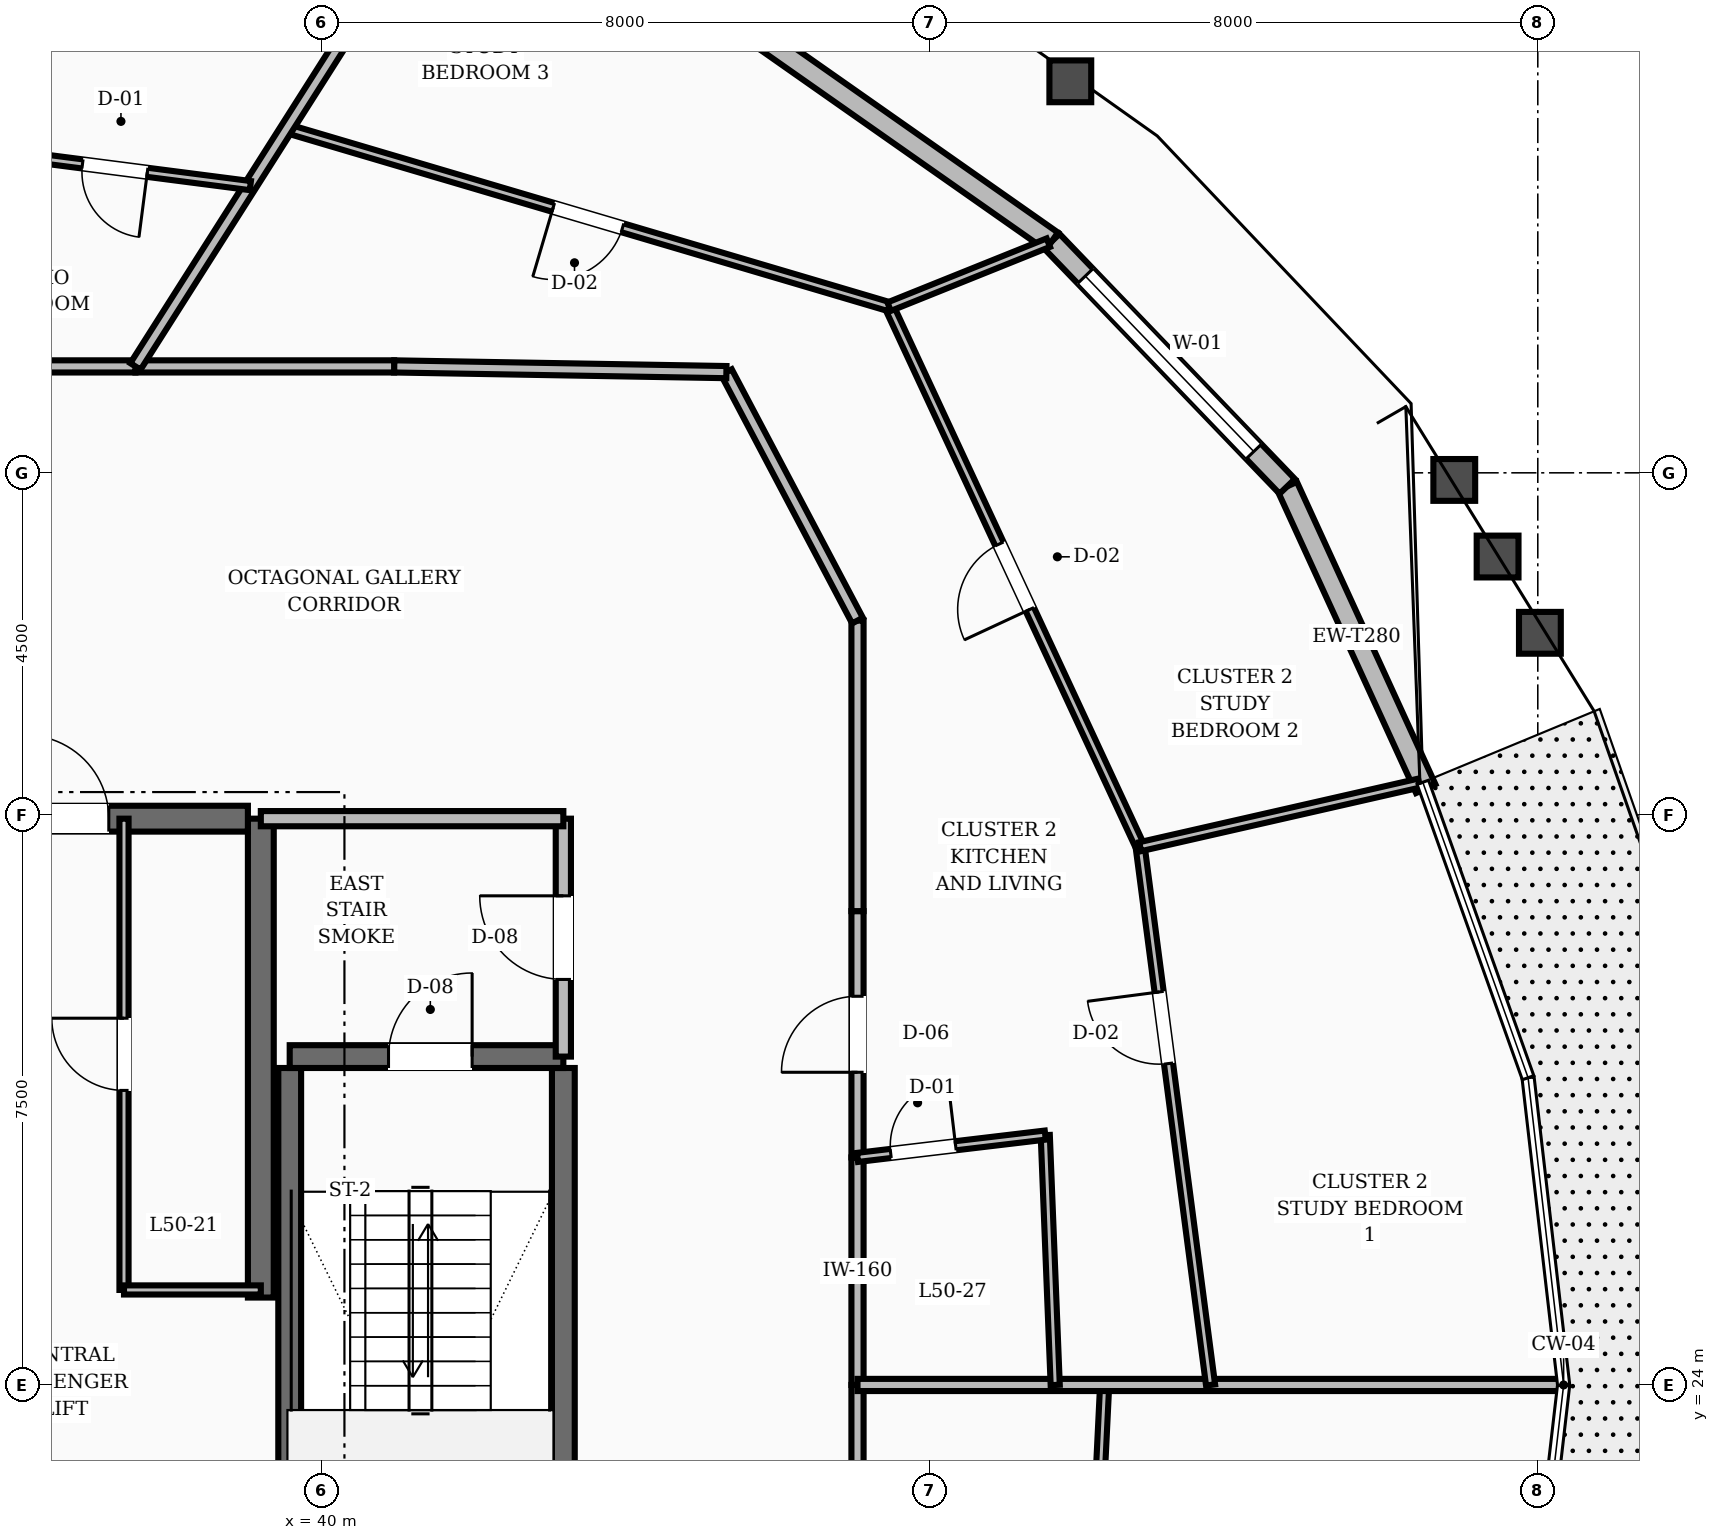
"""IFC4 building model, lengths in metres.
Left out: names, types, materials, properties, quantities, classifications, styles, units other than length and angle.
Written with IfcOpenShell. Run it as: python <this file> out.ifc"""

import sys

from ifc_helpers import new_model, si_unit, direction, frame, frame_2d, origin, place, context, subcontext, project, spatial, rectangle, extrude, element, fill, save


model = new_model("IFC4")
c1 = context("Model", 3, precision=1e-05, world=origin(), true_north=direction((0.0, 1.0)))
c2 = subcontext(c1, "Body", "Model", "MODEL_VIEW")
j1 = project(units=[si_unit("LENGTHUNIT", "METRE"), si_unit("PLANEANGLEUNIT", "RADIAN")], contexts=[c1])
p1 = place(None, origin())
s1 = spatial("IfcSite", under=j1, at=p1, CompositionType="ELEMENT")
p2 = place(p1, origin())
s2 = spatial("IfcBuilding", under=s1, at=p2, CompositionType="ELEMENT")
p3 = place(p2, frame((0.0, 0.0, 192.8)))
s3 = spatial("IfcBuildingStorey", under=s2, at=p3, CompositionType="ELEMENT", Elevation=192.8)
p4 = place(p3, frame((39.2, 25.15, 0.0), z_axis=(0.0, 0.0, 1.0), x_axis=(0.0, 1.0, 0.0)))
e1 = element("IfcWall", 1, at=p4, inside=s3, PredefinedType="SHEAR", context=c2, shape_type="SweptSolid", body=[
    extrude(rectangle(XDim=6.3, YDim=0.34, at=frame_2d((3.15, 0.0))), origin(), (0.0, 0.0, 1.0), 3.6),
])
p5 = place(p3, frame((35.8, 31.45, 0.0), z_axis=(0.0, 0.0, 1.0), x_axis=(1.0, 0.0, 0.0)))
e2 = element("IfcWall", 2, at=p5, inside=s3, PredefinedType="SHEAR", context=c2, shape_type="SweptSolid", body=[
    extrude(rectangle(XDim=3.23, YDim=0.34, at=frame_2d((1.615, 0.0))), origin(), (0.0, 0.0, 1.0), 3.6),
])
p6 = place(p5, frame((0.3, 0.0, 0.0)))
e3 = element("IfcOpeningElement", 3, at=p6, cuts=e2, PredefinedType="OPENING", context=c2, shape_type="SweptSolid", body=[
    extrude(rectangle(XDim=1.1, YDim=2.1, at=frame_2d((0.55, 1.05))), frame((0.0, 0.18, 0.0), z_axis=(0.0, -1.0, 0.0), x_axis=(1.0, 0.0, 0.0)), (0.0, 0.0, 1.0), 0.36),
])
for number, where, z_axis, x_axis in (
    (4, (43.18, 19.43, 0.0), (0.0, 0.0, 1.0), (0.0, 1.0, 0.0)),
    (5, (39.58, 19.43, 0.0), (0.0, 0.0, 1.0), (0.0, 1.0, 0.0)),
):
    element("IfcWall", number, at=place(p3, frame(where, z_axis=z_axis, x_axis=x_axis)), inside=s3, PredefinedType="SHEAR", context=c2, shape_type="SweptSolid", body=[
        extrude(rectangle(XDim=8.74, YDim=0.3, at=frame_2d((4.37, 0.0))), origin(), (0.0, 0.0, 1.0), 3.6),
    ])
p7 = place(p3, frame((39.58, 28.32, 0.0), z_axis=(0.0, 0.0, 1.0), x_axis=(1.0, 0.0, 0.0)))
e6 = element("IfcWall", 6, at=p7, inside=s3, PredefinedType="SHEAR", context=c2, shape_type="SweptSolid", body=[
    extrude(rectangle(XDim=3.6, YDim=0.3, at=frame_2d((1.8, 0.0))), origin(), (0.0, 0.0, 1.0), 3.6),
])
p8 = place(p7, frame((1.3, 0.0, 0.0)))
e7 = element("IfcOpeningElement", 7, at=p8, cuts=e6, PredefinedType="OPENING", context=c2, shape_type="SweptSolid", body=[
    extrude(rectangle(XDim=1.1, YDim=2.1, at=frame_2d((0.55, 1.05))), frame((0.0, 0.16, 0.0), z_axis=(0.0, -1.0, 0.0), x_axis=(1.0, 0.0, 0.0)), (0.0, 0.0, 1.0), 0.32),
])
p9 = place(p3, frame((54.525, 31.845, 0.0), z_axis=(0.0, 0.0, 1.0), x_axis=(-0.416479815363, 0.909144962806, 0.0)))
e8 = element("IfcWall", 8, at=p9, inside=s3, PredefinedType="STANDARD", context=c2, shape_type="SweptSolid", body=[
    extrude(rectangle(XDim=4.374, YDim=0.28, at=frame_2d((2.187, 0.0))), origin(), (0.0, 0.0, 1.0), 2.82),
])
p10 = place(p3, frame((52.704, 35.822, 0.0), z_axis=(0.0, 0.0, 1.0), x_axis=(-0.692654585046, 0.721269454375, 0.0)))
e9 = element("IfcWall", 9, at=p10, inside=s3, PredefinedType="STANDARD", context=c2, shape_type="SweptSolid", body=[
    extrude(rectangle(XDim=4.471, YDim=0.28, at=frame_2d((2.235, 0.0))), origin(), (0.0, 0.0, 1.0), 2.82),
])
p11 = place(p10, frame((0.635, 0.0, 0.8)))
e10 = element("IfcOpeningElement", 10, at=p11, cuts=e9, PredefinedType="OPENING", context=c2, shape_type="SweptSolid", body=[
    extrude(rectangle(XDim=3.2, YDim=1.65, at=frame_2d((1.6, 0.825))), frame((0.0, 0.15, 0.0), z_axis=(0.0, -1.0, 0.0), x_axis=(1.0, 0.0, 0.0)), (0.0, 0.0, 1.0), 0.3),
])
p12 = place(p3, frame((49.607, 39.047, 0.0), z_axis=(0.0, 0.0, 1.0), x_axis=(-0.818721405334, 0.574190961657, 0.0)))
e11 = element("IfcWall", 11, at=p12, inside=s3, PredefinedType="STANDARD", context=c2, shape_type="SweptSolid", body=[
    extrude(rectangle(XDim=4.609, YDim=0.28, at=frame_2d((2.304, 0.0))), origin(), (0.0, 0.0, 1.0), 2.82),
])
p13 = place(p3, frame((43.18, 28.32, 0.0), z_axis=(0.0, 0.0, 1.0), x_axis=(0.0, 1.0, 0.0)))
e12 = element("IfcWall", 12, at=p13, inside=s3, PredefinedType="SOLIDWALL", context=c2, shape_type="SweptSolid", body=[
    extrude(rectangle(XDim=3.13, YDim=0.2, at=frame_2d((1.565, 0.0))), origin(), (0.0, 0.0, 1.0), 2.8),
])
p14 = place(p13, frame((1.015, 0.0, 0.0)))
e13 = element("IfcOpeningElement", 13, at=p14, cuts=e12, PredefinedType="OPENING", context=c2, shape_type="SweptSolid", body=[
    extrude(rectangle(XDim=1.1, YDim=2.1, at=frame_2d((0.55, 1.05))), frame((0.0, 0.11, 0.0), z_axis=(0.0, -1.0, 0.0), x_axis=(1.0, 0.0, 0.0)), (0.0, 0.0, 1.0), 0.22),
])
p15 = place(p3, frame((39.2, 31.45, 0.0), z_axis=(0.0, 0.0, 1.0), x_axis=(1.0, 0.0, 0.0)))
e14 = element("IfcWall", 14, at=p15, inside=s3, PredefinedType="SOLIDWALL", context=c2, shape_type="SweptSolid", body=[
    extrude(rectangle(XDim=3.98, YDim=0.2, at=frame_2d((1.99, 0.0))), origin(), (0.0, 0.0, 1.0), 2.8),
])
p16 = place(p3, frame((37.4, 25.25, 0.0), z_axis=(0.0, 0.0, 1.0), x_axis=(0.0, 1.0, 0.0)))
e15 = element("IfcWall", 15, at=p16, inside=s3, PredefinedType="PARTITIONING", context=c2, shape_type="SweptSolid", body=[
    extrude(rectangle(XDim=6.2, YDim=0.12, at=frame_2d((3.1, 0.0))), origin(), (0.0, 0.0, 1.0), 2.8),
])
p17 = place(p16, frame((2.625, 0.0, 0.0)))
e16 = element("IfcOpeningElement", 16, at=p17, cuts=e15, PredefinedType="OPENING", context=c2, shape_type="SweptSolid", body=[
    extrude(rectangle(XDim=0.95, YDim=2.1, at=frame_2d((0.475, 1.05))), frame((0.0, 0.07, 0.0), z_axis=(0.0, -1.0, 0.0), x_axis=(1.0, 0.0, 0.0)), (0.0, 0.0, 1.0), 0.14),
])
p18 = place(p3, frame((37.4, 25.25, 0.0), z_axis=(0.0, 0.0, 1.0), x_axis=(1.0, 0.0, 0.0)))
e17 = element("IfcWall", 17, at=p18, inside=s3, PredefinedType="PARTITIONING", context=c2, shape_type="SweptSolid", body=[
    extrude(rectangle(XDim=1.8, YDim=0.12, at=frame_2d((0.9, 0.0))), origin(), (0.0, 0.0, 1.0), 2.8),
])
p19 = place(p3, frame((47.05, 24.0, 0.0), z_axis=(0.0, 0.0, 1.0), x_axis=(0.0, 1.0, 0.0)))
e18 = element("IfcWall", 18, at=p19, inside=s3, PredefinedType="SOLIDWALL", context=c2, shape_type="SweptSolid", body=[
    extrude(rectangle(XDim=2.994, YDim=0.16, at=frame_2d((1.497, 0.0))), origin(), (0.0, 0.0, 1.0), 2.8),
])
p20 = place(p3, frame((47.05, 26.994, 0.0), z_axis=(0.0, 0.0, 1.0), x_axis=(0.0, 1.0, 0.0)))
e19 = element("IfcWall", 19, at=p20, inside=s3, PredefinedType="SOLIDWALL", context=c2, shape_type="SweptSolid", body=[
    extrude(rectangle(XDim=3.24, YDim=0.16, at=frame_2d((1.62, 0.0))), origin(), (0.0, 0.0, 1.0), 2.8),
])
p21 = place(p20, frame((1.12, 0.0, 0.0)))
e20 = element("IfcOpeningElement", 20, at=p21, cuts=e19, PredefinedType="OPENING", context=c2, shape_type="SweptSolid", body=[
    extrude(rectangle(XDim=1.0, YDim=2.1, at=frame_2d((0.5, 1.05))), frame((0.0, 0.09, 0.0), z_axis=(0.0, -1.0, 0.0), x_axis=(1.0, 0.0, 0.0)), (0.0, 0.0, 1.0), 0.18),
])
p22 = place(p3, frame((47.05, 30.234, 0.0), z_axis=(0.0, 0.0, 1.0), x_axis=(0.0, 1.0, 0.0)))
e21 = element("IfcWall", 21, at=p22, inside=s3, PredefinedType="SOLIDWALL", context=c2, shape_type="SweptSolid", body=[
    extrude(rectangle(XDim=3.822, YDim=0.16, at=frame_2d((1.911, 0.0))), origin(), (0.0, 0.0, 1.0), 2.8),
])
p23 = place(p3, frame((47.05, 34.056, 0.0), z_axis=(0.0, 0.0, 1.0), x_axis=(-0.466737093093, 0.884396113702, 0.0)))
e22 = element("IfcWall", 22, at=p23, inside=s3, PredefinedType="SOLIDWALL", context=c2, shape_type="SweptSolid", body=[
    extrude(rectangle(XDim=3.696, YDim=0.16, at=frame_2d((1.848, 0.0))), origin(), (0.0, 0.0, 1.0), 2.8),
])
p24 = place(p3, frame((45.325, 37.325, 0.0), z_axis=(0.0, 0.0, 1.0), x_axis=(-0.999853038912, 0.017143528788, 0.0)))
e23 = element("IfcWall", 23, at=p24, inside=s3, PredefinedType="SOLIDWALL", context=c2, shape_type="SweptSolid", body=[
    extrude(rectangle(XDim=4.372, YDim=0.16, at=frame_2d((2.186, 0.0))), origin(), (0.0, 0.0, 1.0), 2.8),
])
p25 = place(p3, frame((40.954, 37.4, 0.0), z_axis=(0.0, 0.0, 1.0), x_axis=(-1.0, 0.0, 0.0)))
e24 = element("IfcWall", 24, at=p25, inside=s3, PredefinedType="SOLIDWALL", context=c2, shape_type="SweptSolid", body=[
    extrude(rectangle(XDim=3.403, YDim=0.16, at=frame_2d((1.702, 0.0))), origin(), (0.0, 0.0, 1.0), 2.8),
])
p26 = place(p3, frame((37.551, 37.4, 0.0), z_axis=(0.0, 0.0, 1.0), x_axis=(-1.0, 0.0, 0.0)))
e25 = element("IfcWall", 25, at=p26, inside=s3, PredefinedType="SOLIDWALL", context=c2, shape_type="SweptSolid", body=[
    extrude(rectangle(XDim=2.885, YDim=0.16, at=frame_2d((1.443, 0.0))), origin(), (0.0, 0.0, 1.0), 2.8),
])
p27 = place(p3, frame((47.05, 21.006, 0.0), z_axis=(0.0, 0.0, 1.0), x_axis=(0.0, 1.0, 0.0)))
e26 = element("IfcWall", 26, at=p27, inside=s3, PredefinedType="SOLIDWALL", context=c2, shape_type="SweptSolid", body=[
    extrude(rectangle(XDim=2.994, YDim=0.16, at=frame_2d((1.497, 0.0))), origin(), (0.0, 0.0, 1.0), 2.8),
])
p28 = place(p3, frame((50.138, 20.639, 0.0), z_axis=(0.0, 0.0, 1.0), x_axis=(0.048689007284, 0.998813986971, 0.0)))
e27 = element("IfcWall", 27, at=p28, inside=s3, PredefinedType="PARTITIONING", context=c2, shape_type="SweptSolid", body=[
    extrude(rectangle(XDim=3.365, YDim=0.12, at=frame_2d((1.682, 0.0))), origin(), (0.0, 0.0, 1.0), 2.8),
])
p29 = place(p3, frame((47.05, 24.0, 0.0), z_axis=(0.0, 0.0, 1.0), x_axis=(1.0, 0.0, 0.0)))
e28 = element("IfcWall", 28, at=p29, inside=s3, PredefinedType="SOLIDWALL", context=c2, shape_type="SweptSolid", body=[
    extrude(rectangle(XDim=9.24, YDim=0.16, at=frame_2d((4.62, 0.0))), origin(), (0.0, 0.0, 1.0), 2.8),
])
p30 = place(p3, frame((49.651, 24.0, 0.0), z_axis=(0.0, 0.0, 1.0), x_axis=(-0.039778354948, 0.999208528025, 0.0)))
e29 = element("IfcWall", 29, at=p30, inside=s3, PredefinedType="PARTITIONING", context=c2, shape_type="SweptSolid", body=[
    extrude(rectangle(XDim=3.29, YDim=0.12, at=frame_2d((1.645, 0.0))), origin(), (0.0, 0.0, 1.0), 2.8),
])
p31 = place(p3, frame((47.05, 26.994, 0.0), z_axis=(0.0, 0.0, 1.0), x_axis=(0.993017319692, 0.117968651736, 0.0)))
e30 = element("IfcWall", 30, at=p31, inside=s3, PredefinedType="PARTITIONING", context=c2, shape_type="SweptSolid", body=[
    extrude(rectangle(XDim=2.488, YDim=0.12, at=frame_2d((1.244, 0.0))), origin(), (0.0, 0.0, 1.0), 2.8),
])
p32 = place(p31, frame((0.44, 0.0, 0.0)))
e31 = element("IfcOpeningElement", 31, at=p32, cuts=e30, PredefinedType="OPENING", context=c2, shape_type="SweptSolid", body=[
    extrude(rectangle(XDim=0.86, YDim=2.1, at=frame_2d((0.43, 1.05))), frame((0.0, 0.07, 0.0), z_axis=(0.0, -1.0, 0.0), x_axis=(1.0, 0.0, 0.0)), (0.0, 0.0, 1.0), 0.14),
])
p33 = place(p3, frame((51.695, 24.0, 0.0), z_axis=(0.0, 0.0, 1.0), x_axis=(-0.129733767917, 0.99154886388, 0.0)))
e32 = element("IfcWall", 32, at=p33, inside=s3, PredefinedType="PARTITIONING", context=c2, shape_type="SweptSolid", body=[
    extrude(rectangle(XDim=7.142, YDim=0.12, at=frame_2d((3.571, 0.0))), origin(), (0.0, 0.0, 1.0), 2.8),
])
p34 = place(p33, frame((4.264, 0.0, 0.0)))
e33 = element("IfcOpeningElement", 33, at=p34, cuts=e32, PredefinedType="OPENING", context=c2, shape_type="SweptSolid", body=[
    extrude(rectangle(XDim=0.95, YDim=2.1, at=frame_2d((0.475, 1.05))), frame((0.0, 0.07, 0.0), z_axis=(0.0, -1.0, 0.0), x_axis=(1.0, 0.0, 0.0)), (0.0, 0.0, 1.0), 0.14),
])
p35 = place(p3, frame((50.769, 31.081, 0.0), z_axis=(0.0, 0.0, 1.0), x_axis=(-0.421528761088, 0.906815032725, 0.0)))
e34 = element("IfcWall", 34, at=p35, inside=s3, PredefinedType="PARTITIONING", context=c2, shape_type="SweptSolid", body=[
    extrude(rectangle(XDim=7.834, YDim=0.12, at=frame_2d((3.917, 0.0))), origin(), (0.0, 0.0, 1.0), 2.8),
])
p36 = place(p35, frame((3.442, 0.0, 0.0)))
e35 = element("IfcOpeningElement", 35, at=p36, cuts=e34, PredefinedType="OPENING", context=c2, shape_type="SweptSolid", body=[
    extrude(rectangle(XDim=0.95, YDim=2.1, at=frame_2d((0.475, 1.05))), frame((0.0, 0.07, 0.0), z_axis=(0.0, -1.0, 0.0), x_axis=(1.0, 0.0, 0.0)), (0.0, 0.0, 1.0), 0.14),
])
p37 = place(p3, frame((50.769, 31.081, 0.0), z_axis=(0.0, 0.0, 1.0), x_axis=(0.97498354511, 0.222277049567, 0.0)))
e36 = element("IfcWall", 36, at=p37, inside=s3, PredefinedType="PARTITIONING", context=c2, shape_type="SweptSolid", body=[
    extrude(rectangle(XDim=3.764, YDim=0.12, at=frame_2d((1.882, 0.0))), origin(), (0.0, 0.0, 1.0), 2.8),
])
p38 = place(p3, frame((47.466, 38.186, 0.0), z_axis=(0.0, 0.0, 1.0), x_axis=(-0.958949642068, 0.283576416469, 0.0)))
e37 = element("IfcWall", 37, at=p38, inside=s3, PredefinedType="PARTITIONING", context=c2, shape_type="SweptSolid", body=[
    extrude(rectangle(XDim=8.266, YDim=0.12, at=frame_2d((4.133, 0.0))), origin(), (0.0, 0.0, 1.0), 2.8),
])
p39 = place(p38, frame((3.658, 0.0, 0.0)))
e38 = element("IfcOpeningElement", 38, at=p39, cuts=e37, PredefinedType="OPENING", context=c2, shape_type="SweptSolid", body=[
    extrude(rectangle(XDim=0.95, YDim=2.1, at=frame_2d((0.475, 1.05))), frame((0.0, 0.07, 0.0), z_axis=(0.0, -1.0, 0.0), x_axis=(1.0, 0.0, 0.0)), (0.0, 0.0, 1.0), 0.14),
])
p40 = place(p3, frame((47.466, 38.186, 0.0), z_axis=(0.0, 0.0, 1.0), x_axis=(0.927788935217, 0.373105469926, 0.0)))
e39 = element("IfcWall", 39, at=p40, inside=s3, PredefinedType="PARTITIONING", context=c2, shape_type="SweptSolid", body=[
    extrude(rectangle(XDim=2.258, YDim=0.12, at=frame_2d((1.129, 0.0))), origin(), (0.0, 0.0, 1.0), 2.8),
])
p41 = place(p3, frame((37.551, 37.4, 0.0), z_axis=(0.0, 0.0, 1.0), x_axis=(0.536373616105, 0.843980653775, 0.0)))
e40 = element("IfcWall", 40, at=p41, inside=s3, PredefinedType="SOLIDWALL", context=c2, shape_type="SweptSolid", body=[
    extrude(rectangle(XDim=7.367, YDim=0.16, at=frame_2d((3.684, 0.0))), origin(), (0.0, 0.0, 1.0), 2.8),
])
p42 = place(p3, frame((39.062, 39.779, 0.0), z_axis=(0.0, 0.0, 1.0), x_axis=(-0.991764787462, 0.128072660435, 0.0)))
e41 = element("IfcWall", 41, at=p42, inside=s3, PredefinedType="PARTITIONING", context=c2, shape_type="SweptSolid", body=[
    extrude(rectangle(XDim=3.593, YDim=0.12, at=frame_2d((1.797, 0.0))), origin(), (0.0, 0.0, 1.0), 2.8),
])
p43 = place(p42, frame((1.367, 0.0, 0.0)))
e42 = element("IfcOpeningElement", 42, at=p43, cuts=e41, PredefinedType="OPENING", context=c2, shape_type="SweptSolid", body=[
    extrude(rectangle(XDim=0.86, YDim=2.1, at=frame_2d((0.43, 1.05))), frame((0.0, 0.07, 0.0), z_axis=(0.0, -1.0, 0.0), x_axis=(1.0, 0.0, 0.0)), (0.0, 0.0, 1.0), 0.14),
])
p44 = place(p11, origin())
e43 = element("IfcWindow", 43, at=p44, inside=s3, PartitioningType="SINGLE_PANEL", PredefinedType="WINDOW", context=c2, shape_type="SweptSolid", body=[
    extrude(rectangle(XDim=3.2, YDim=1.65, at=frame_2d((1.6, 0.825))), frame((0.0, 0.03, 0.0), z_axis=(0.0, -1.0, 0.0), x_axis=(1.0, 0.0, 0.0)), (0.0, 0.0, 1.0), 0.06),
])
fill(e10, e43)
p45 = place(p8, origin())
e44 = element("IfcDoor", 44, at=p45, inside=s3, OperationType="SINGLE_SWING_RIGHT", PredefinedType="DOOR", context=c2, shape_type="SweptSolid", body=[
    extrude(rectangle(XDim=1.1, YDim=2.1, at=frame_2d((0.55, 1.05))), frame((0.0, 0.025, 0.0), z_axis=(0.0, -1.0, 0.0), x_axis=(1.0, 0.0, 0.0)), (0.0, 0.0, 1.0), 0.05),
])
fill(e7, e44)
p46 = place(p14, origin())
e45 = element("IfcDoor", 45, at=p46, inside=s3, OperationType="SINGLE_SWING_RIGHT", PredefinedType="DOOR", context=c2, shape_type="SweptSolid", body=[
    extrude(rectangle(XDim=1.1, YDim=2.1, at=frame_2d((0.55, 1.05))), frame((0.0, 0.025, 0.0), z_axis=(0.0, -1.0, 0.0), x_axis=(1.0, 0.0, 0.0)), (0.0, 0.0, 1.0), 0.05),
])
fill(e13, e45)
p47 = place(p6, origin())
e46 = element("IfcDoor", 46, at=p47, inside=s3, OperationType="SINGLE_SWING_LEFT", PredefinedType="DOOR", context=c2, shape_type="SweptSolid", body=[
    extrude(rectangle(XDim=1.1, YDim=2.1, at=frame_2d((0.55, 1.05))), frame((0.0, 0.025, 0.0), z_axis=(0.0, -1.0, 0.0), x_axis=(1.0, 0.0, 0.0)), (0.0, 0.0, 1.0), 0.05),
])
fill(e3, e46)
p48 = place(p17, origin())
e47 = element("IfcDoor", 47, at=p48, inside=s3, OperationType="SINGLE_SWING_RIGHT", PredefinedType="DOOR", context=c2, shape_type="SweptSolid", body=[
    extrude(rectangle(XDim=0.95, YDim=2.1, at=frame_2d((0.475, 1.05))), frame((0.0, 0.025, 0.0), z_axis=(0.0, -1.0, 0.0), x_axis=(1.0, 0.0, 0.0)), (0.0, 0.0, 1.0), 0.05),
])
fill(e16, e47)
p49 = place(p32, origin())
e48 = element("IfcDoor", 48, at=p49, inside=s3, OperationType="SINGLE_SWING_RIGHT", PredefinedType="DOOR", context=c2, shape_type="SweptSolid", body=[
    extrude(rectangle(XDim=0.86, YDim=2.1, at=frame_2d((0.43, 1.05))), frame((0.0, 0.025, 0.0), z_axis=(0.0, -1.0, 0.0), x_axis=(1.0, 0.0, 0.0)), (0.0, 0.0, 1.0), 0.05),
])
fill(e31, e48)
p50 = place(p21, origin())
e49 = element("IfcDoor", 49, at=p50, inside=s3, OperationType="SINGLE_SWING_LEFT", PredefinedType="DOOR", context=c2, shape_type="SweptSolid", body=[
    extrude(rectangle(XDim=1.0, YDim=2.1, at=frame_2d((0.5, 1.05))), frame((0.0, 0.025, 0.0), z_axis=(0.0, -1.0, 0.0), x_axis=(1.0, 0.0, 0.0)), (0.0, 0.0, 1.0), 0.05),
])
fill(e20, e49)
p51 = place(p34, origin())
e50 = element("IfcDoor", 50, at=p51, inside=s3, OperationType="SINGLE_SWING_RIGHT", PredefinedType="DOOR", context=c2, shape_type="SweptSolid", body=[
    extrude(rectangle(XDim=0.95, YDim=2.1, at=frame_2d((0.475, 1.05))), frame((0.0, 0.025, 0.0), z_axis=(0.0, -1.0, 0.0), x_axis=(1.0, 0.0, 0.0)), (0.0, 0.0, 1.0), 0.05),
])
fill(e33, e50)
p52 = place(p36, origin())
e51 = element("IfcDoor", 51, at=p52, inside=s3, OperationType="SINGLE_SWING_LEFT", PredefinedType="DOOR", context=c2, shape_type="SweptSolid", body=[
    extrude(rectangle(XDim=0.95, YDim=2.1, at=frame_2d((0.475, 1.05))), frame((0.0, 0.025, 0.0), z_axis=(0.0, -1.0, 0.0), x_axis=(1.0, 0.0, 0.0)), (0.0, 0.0, 1.0), 0.05),
])
fill(e35, e51)
p53 = place(p39, origin())
e52 = element("IfcDoor", 52, at=p53, inside=s3, OperationType="SINGLE_SWING_RIGHT", PredefinedType="DOOR", context=c2, shape_type="SweptSolid", body=[
    extrude(rectangle(XDim=0.95, YDim=2.1, at=frame_2d((0.475, 1.05))), frame((0.0, 0.025, 0.0), z_axis=(0.0, -1.0, 0.0), x_axis=(1.0, 0.0, 0.0)), (0.0, 0.0, 1.0), 0.05),
])
fill(e38, e52)
p54 = place(p43, origin())
e53 = element("IfcDoor", 53, at=p54, inside=s3, OperationType="SINGLE_SWING_LEFT", PredefinedType="DOOR", context=c2, shape_type="SweptSolid", body=[
    extrude(rectangle(XDim=0.86, YDim=2.1, at=frame_2d((0.43, 1.05))), frame((0.0, 0.025, 0.0), z_axis=(0.0, -1.0, 0.0), x_axis=(1.0, 0.0, 0.0)), (0.0, 0.0, 1.0), 0.05),
])
fill(e42, e53)
save(model, sys.argv[1])
